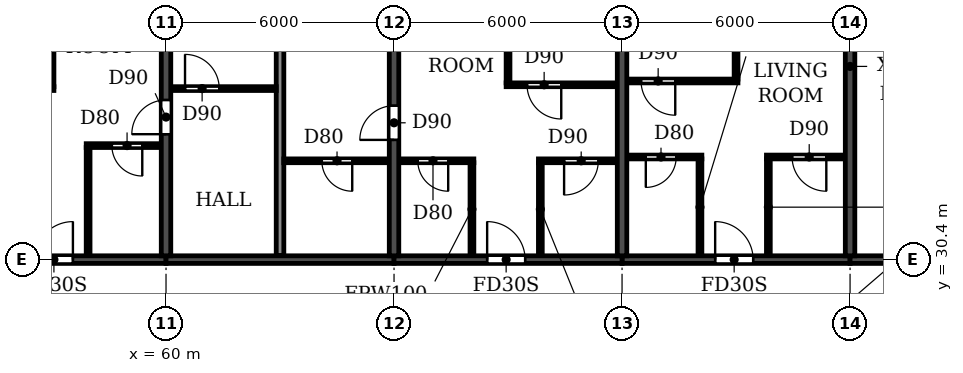
"""IFC4 building model, lengths in metres.
Left out: names, types, materials, properties, quantities, classifications, styles, units other than length and angle.
Written with IfcOpenShell. Run it as: python <this file> out.ifc"""

import sys

from ifc_helpers import new_model, si_unit, direction, frame, frame_2d, origin, place, context, subcontext, project, spatial, rectangle, extrude, element, fill, save


model = new_model("IFC4")
c1 = context("Model", 3, precision=1e-05, world=origin(), true_north=direction((0.0, 1.0)))
c2 = subcontext(c1, "Body", "Model", "MODEL_VIEW")
j1 = project(units=[si_unit("LENGTHUNIT", "METRE"), si_unit("PLANEANGLEUNIT", "RADIAN")], contexts=[c1])
p1 = place(None, origin())
s1 = spatial("IfcSite", under=j1, at=p1, CompositionType="ELEMENT")
p2 = place(p1, origin())
s2 = spatial("IfcBuilding", under=s1, at=p2, CompositionType="ELEMENT")
p3 = place(p2, frame((0.0, 0.0, 175.2)))
s3 = spatial("IfcBuildingStorey", under=s2, at=p3, CompositionType="ELEMENT", Elevation=175.2)
p4 = place(p3, frame((60.0, 30.5, 0.0), z_axis=(0.0, 0.0, 1.0), x_axis=(0.0, 1.0, 0.0)))
e1 = element("IfcWall", 1, at=p4, inside=s3, PredefinedType="SHEAR", context=c2, shape_type="SweptSolid", body=[
    extrude(rectangle(XDim=10.5, YDim=0.25, at=frame_2d((5.25, 0.0))), origin(), (0.0, 0.0, 1.0), 3.08),
])
p5 = place(p4, frame((3.2, 0.0, 0.0)))
e2 = element("IfcOpeningElement", 2, at=p5, cuts=e1, PredefinedType="OPENING", context=c2, shape_type="SweptSolid", body=[
    extrude(rectangle(XDim=0.9, YDim=2.1, at=frame_2d((0.45, 1.05))), frame((0.0, 0.135, 0.0), z_axis=(0.0, -1.0, 0.0), x_axis=(1.0, 0.0, 0.0)), (0.0, 0.0, 1.0), 0.27),
])
p6 = place(p3, frame((66.0, 30.5, 0.0), z_axis=(0.0, 0.0, 1.0), x_axis=(0.0, 1.0, 0.0)))
e3 = element("IfcWall", 3, at=p6, inside=s3, PredefinedType="SHEAR", context=c2, shape_type="SweptSolid", body=[
    extrude(rectangle(XDim=10.5, YDim=0.25, at=frame_2d((5.25, 0.0))), origin(), (0.0, 0.0, 1.0), 3.08),
])
p7 = place(p6, frame((3.05, 0.0, 0.0)))
e4 = element("IfcOpeningElement", 4, at=p7, cuts=e3, PredefinedType="OPENING", context=c2, shape_type="SweptSolid", body=[
    extrude(rectangle(XDim=0.9, YDim=2.1, at=frame_2d((0.45, 1.05))), frame((0.0, 0.135, 0.0), z_axis=(0.0, -1.0, 0.0), x_axis=(1.0, 0.0, 0.0)), (0.0, 0.0, 1.0), 0.27),
])
for number, where, z_axis, x_axis in (
    (5, (72.0, 30.5, 0.0), (0.0, 0.0, 1.0), (0.0, 1.0, 0.0)),
    (6, (78.0, 30.5, 0.0), (0.0, 0.0, 1.0), (0.0, 1.0, 0.0)),
):
    element("IfcWall", number, at=place(p3, frame(where, z_axis=z_axis, x_axis=x_axis)), inside=s3, PredefinedType="SHEAR", context=c2, shape_type="SweptSolid", body=[
        extrude(rectangle(XDim=10.5, YDim=0.25, at=frame_2d((5.25, 0.0))), origin(), (0.0, 0.0, 1.0), 3.08),
    ])
p8 = place(p3, frame((54.0, 30.4, 0.0), z_axis=(0.0, 0.0, 1.0), x_axis=(1.0, 0.0, 0.0)))
e7 = element("IfcWall", 7, at=p8, inside=s3, PredefinedType="SHEAR", context=c2, shape_type="SweptSolid", body=[
    extrude(rectangle(XDim=6.0, YDim=0.2, at=frame_2d((3.0, 0.0))), origin(), (0.0, 0.0, 1.0), 2.48),
])
p9 = place(p8, frame((2.55, 0.0, 0.0)))
e8 = element("IfcOpeningElement", 8, at=p9, cuts=e7, PredefinedType="OPENING", context=c2, shape_type="SweptSolid", body=[
    extrude(rectangle(XDim=1.0, YDim=2.1, at=frame_2d((0.5, 1.05))), frame((0.0, 0.11, 0.0), z_axis=(0.0, -1.0, 0.0), x_axis=(1.0, 0.0, 0.0)), (0.0, 0.0, 1.0), 0.22),
])
p10 = place(p3, frame((60.0, 30.4, 0.0), z_axis=(0.0, 0.0, 1.0), x_axis=(1.0, 0.0, 0.0)))
e9 = element("IfcWall", 9, at=p10, inside=s3, PredefinedType="SHEAR", context=c2, shape_type="SweptSolid", body=[
    extrude(rectangle(XDim=6.0, YDim=0.2, at=frame_2d((3.0, 0.0))), origin(), (0.0, 0.0, 1.0), 2.48),
])
p11 = place(p3, frame((66.0, 30.4, 0.0), z_axis=(0.0, 0.0, 1.0), x_axis=(1.0, 0.0, 0.0)))
e10 = element("IfcWall", 10, at=p11, inside=s3, PredefinedType="SHEAR", context=c2, shape_type="SweptSolid", body=[
    extrude(rectangle(XDim=6.0, YDim=0.2, at=frame_2d((3.0, 0.0))), origin(), (0.0, 0.0, 1.0), 2.48),
])
p12 = place(p11, frame((2.45, 0.0, 0.0)))
e11 = element("IfcOpeningElement", 11, at=p12, cuts=e10, PredefinedType="OPENING", context=c2, shape_type="SweptSolid", body=[
    extrude(rectangle(XDim=1.0, YDim=2.1, at=frame_2d((0.5, 1.05))), frame((0.0, 0.11, 0.0), z_axis=(0.0, -1.0, 0.0), x_axis=(1.0, 0.0, 0.0)), (0.0, 0.0, 1.0), 0.22),
])
p13 = place(p3, frame((72.0, 30.4, 0.0), z_axis=(0.0, 0.0, 1.0), x_axis=(1.0, 0.0, 0.0)))
e12 = element("IfcWall", 12, at=p13, inside=s3, PredefinedType="SHEAR", context=c2, shape_type="SweptSolid", body=[
    extrude(rectangle(XDim=6.0, YDim=0.2, at=frame_2d((3.0, 0.0))), origin(), (0.0, 0.0, 1.0), 2.48),
])
p14 = place(p13, frame((2.45, 0.0, 0.0)))
e13 = element("IfcOpeningElement", 13, at=p14, cuts=e12, PredefinedType="OPENING", context=c2, shape_type="SweptSolid", body=[
    extrude(rectangle(XDim=1.0, YDim=2.1, at=frame_2d((0.5, 1.05))), frame((0.0, 0.11, 0.0), z_axis=(0.0, -1.0, 0.0), x_axis=(1.0, 0.0, 0.0)), (0.0, 0.0, 1.0), 0.22),
])
p15 = place(p3, frame((78.0, 30.4, 0.0), z_axis=(0.0, 0.0, 1.0), x_axis=(1.0, 0.0, 0.0)))
e14 = element("IfcWall", 14, at=p15, inside=s3, PredefinedType="SHEAR", context=c2, shape_type="SweptSolid", body=[
    extrude(rectangle(XDim=5.8, YDim=0.2, at=frame_2d((2.9, 0.0))), origin(), (0.0, 0.0, 1.0), 2.48),
])
p16 = place(p15, frame((2.5, 0.0, 0.0)))
e15 = element("IfcOpeningElement", 15, at=p16, cuts=e14, PredefinedType="OPENING", context=c2, shape_type="SweptSolid", body=[
    extrude(rectangle(XDim=1.0, YDim=2.1, at=frame_2d((0.5, 1.05))), frame((0.0, 0.11, 0.0), z_axis=(0.0, -1.0, 0.0), x_axis=(1.0, 0.0, 0.0)), (0.0, 0.0, 1.0), 0.22),
])
p17 = place(p3, frame((63.0, 30.51, 0.0), z_axis=(0.0, 0.0, 1.0), x_axis=(0.0, 1.0, 0.0)))
e16 = element("IfcWall", 16, at=p17, inside=s3, PredefinedType="PARTITIONING", context=c2, shape_type="SweptSolid", body=[
    extrude(rectangle(XDim=10.63, YDim=0.2, at=frame_2d((5.315, 0.0))), origin(), (0.0, 0.0, 1.0), 3.08),
])
p18 = place(p3, frame((63.1, 33.0, 0.0), z_axis=(0.0, 0.0, 1.0), x_axis=(1.0, 0.0, 0.0)))
e17 = element("IfcWall", 17, at=p18, inside=s3, PredefinedType="PARTITIONING", context=c2, shape_type="SweptSolid", body=[
    extrude(rectangle(XDim=2.765, YDim=0.1, at=frame_2d((1.382, 0.0))), origin(), (0.0, 0.0, 1.0), 3.08),
])
p19 = place(p18, frame((1.0, 0.0, 0.0)))
e18 = element("IfcOpeningElement", 18, at=p19, cuts=e17, PredefinedType="OPENING", context=c2, shape_type="SweptSolid", body=[
    extrude(rectangle(XDim=0.8, YDim=2.1, at=frame_2d((0.4, 1.05))), frame((0.0, 0.06, 0.0), z_axis=(0.0, -1.0, 0.0), x_axis=(1.0, 0.0, 0.0)), (0.0, 0.0, 1.0), 0.12),
])
p20 = place(p3, frame((66.135, 33.0, 0.0), z_axis=(0.0, 0.0, 1.0), x_axis=(1.0, 0.0, 0.0)))
e19 = element("IfcWall", 19, at=p20, inside=s3, PredefinedType="PARTITIONING", context=c2, shape_type="SweptSolid", body=[
    extrude(rectangle(XDim=1.965, YDim=0.1, at=frame_2d((0.982, 0.0))), origin(), (0.0, 0.0, 1.0), 3.08),
])
p21 = place(p20, frame((0.49, 0.0, 0.0)))
e20 = element("IfcOpeningElement", 20, at=p21, cuts=e19, PredefinedType="OPENING", context=c2, shape_type="SweptSolid", body=[
    extrude(rectangle(XDim=0.8, YDim=2.1, at=frame_2d((0.4, 1.05))), frame((0.0, 0.06, 0.0), z_axis=(0.0, -1.0, 0.0), x_axis=(1.0, 0.0, 0.0)), (0.0, 0.0, 1.0), 0.12),
])
p22 = place(p3, frame((69.8, 33.0, 0.0), z_axis=(0.0, 0.0, 1.0), x_axis=(1.0, 0.0, 0.0)))
e21 = element("IfcWall", 21, at=p22, inside=s3, PredefinedType="PARTITIONING", context=c2, shape_type="SweptSolid", body=[
    extrude(rectangle(XDim=2.065, YDim=0.1, at=frame_2d((1.032, 0.0))), origin(), (0.0, 0.0, 1.0), 3.08),
])
p23 = place(p22, frame((0.675, 0.0, 0.0)))
e22 = element("IfcOpeningElement", 22, at=p23, cuts=e21, PredefinedType="OPENING", context=c2, shape_type="SweptSolid", body=[
    extrude(rectangle(XDim=0.9, YDim=2.1, at=frame_2d((0.45, 1.05))), frame((0.0, 0.06, 0.0), z_axis=(0.0, -1.0, 0.0), x_axis=(1.0, 0.0, 0.0)), (0.0, 0.0, 1.0), 0.12),
])
p24 = place(p3, frame((72.135, 33.1, 0.0), z_axis=(0.0, 0.0, 1.0), x_axis=(1.0, 0.0, 0.0)))
e23 = element("IfcWall", 23, at=p24, inside=s3, PredefinedType="PARTITIONING", context=c2, shape_type="SweptSolid", body=[
    extrude(rectangle(XDim=1.965, YDim=0.1, at=frame_2d((0.982, 0.0))), origin(), (0.0, 0.0, 1.0), 3.08),
])
p25 = place(p24, frame((0.49, 0.0, 0.0)))
e24 = element("IfcOpeningElement", 24, at=p25, cuts=e23, PredefinedType="OPENING", context=c2, shape_type="SweptSolid", body=[
    extrude(rectangle(XDim=0.8, YDim=2.1, at=frame_2d((0.4, 1.05))), frame((0.0, 0.06, 0.0), z_axis=(0.0, -1.0, 0.0), x_axis=(1.0, 0.0, 0.0)), (0.0, 0.0, 1.0), 0.12),
])
p26 = place(p3, frame((75.8, 33.1, 0.0), z_axis=(0.0, 0.0, 1.0), x_axis=(1.0, 0.0, 0.0)))
e25 = element("IfcWall", 25, at=p26, inside=s3, PredefinedType="PARTITIONING", context=c2, shape_type="SweptSolid", body=[
    extrude(rectangle(XDim=2.065, YDim=0.1, at=frame_2d((1.032, 0.0))), origin(), (0.0, 0.0, 1.0), 3.08),
])
p27 = place(p26, frame((0.675, 0.0, 0.0)))
e26 = element("IfcOpeningElement", 26, at=p27, cuts=e25, PredefinedType="OPENING", context=c2, shape_type="SweptSolid", body=[
    extrude(rectangle(XDim=0.9, YDim=2.1, at=frame_2d((0.45, 1.05))), frame((0.0, 0.06, 0.0), z_axis=(0.0, -1.0, 0.0), x_axis=(1.0, 0.0, 0.0)), (0.0, 0.0, 1.0), 0.12),
])
p28 = place(p3, frame((57.9, 33.4, 0.0), z_axis=(0.0, 0.0, 1.0), x_axis=(1.0, 0.0, 0.0)))
e27 = element("IfcWall", 27, at=p28, inside=s3, PredefinedType="PARTITIONING", context=c2, shape_type="SweptSolid", body=[
    extrude(rectangle(XDim=1.965, YDim=0.1, at=frame_2d((0.982, 0.0))), origin(), (0.0, 0.0, 1.0), 3.08),
])
p29 = place(p28, frame((0.675, 0.0, 0.0)))
e28 = element("IfcOpeningElement", 28, at=p29, cuts=e27, PredefinedType="OPENING", context=c2, shape_type="SweptSolid", body=[
    extrude(rectangle(XDim=0.8, YDim=2.1, at=frame_2d((0.4, 1.05))), frame((0.0, 0.06, 0.0), z_axis=(0.0, -1.0, 0.0), x_axis=(1.0, 0.0, 0.0)), (0.0, 0.0, 1.0), 0.12),
])
p30 = place(p3, frame((54.135, 34.9, 0.0), z_axis=(0.0, 0.0, 1.0), x_axis=(1.0, 0.0, 0.0)))
e29 = element("IfcWall", 29, at=p30, inside=s3, PredefinedType="PARTITIONING", context=c2, shape_type="SweptSolid", body=[
    extrude(rectangle(XDim=2.915, YDim=0.1, at=frame_2d((1.458, 0.0))), origin(), (0.0, 0.0, 1.0), 3.08),
])
p31 = place(p30, frame((0.365, 0.0, 0.0)))
e30 = element("IfcOpeningElement", 30, at=p31, cuts=e29, PredefinedType="OPENING", context=c2, shape_type="SweptSolid", body=[
    extrude(rectangle(XDim=0.9, YDim=2.1, at=frame_2d((0.45, 1.05))), frame((0.0, 0.06, 0.0), z_axis=(0.0, -1.0, 0.0), x_axis=(1.0, 0.0, 0.0)), (0.0, 0.0, 1.0), 0.12),
])
p32 = place(p3, frame((60.135, 34.9, 0.0), z_axis=(0.0, 0.0, 1.0), x_axis=(1.0, 0.0, 0.0)))
e31 = element("IfcWall", 31, at=p32, inside=s3, PredefinedType="PARTITIONING", context=c2, shape_type="SweptSolid", body=[
    extrude(rectangle(XDim=2.765, YDim=0.1, at=frame_2d((1.382, 0.0))), origin(), (0.0, 0.0, 1.0), 3.08),
])
p33 = place(p32, frame((0.365, 0.0, 0.0)))
e32 = element("IfcOpeningElement", 32, at=p33, cuts=e31, PredefinedType="OPENING", context=c2, shape_type="SweptSolid", body=[
    extrude(rectangle(XDim=0.9, YDim=2.1, at=frame_2d((0.45, 1.05))), frame((0.0, 0.06, 0.0), z_axis=(0.0, -1.0, 0.0), x_axis=(1.0, 0.0, 0.0)), (0.0, 0.0, 1.0), 0.12),
])
p34 = place(p3, frame((68.95, 35.0, 0.0), z_axis=(0.0, 0.0, 1.0), x_axis=(1.0, 0.0, 0.0)))
e33 = element("IfcWall", 33, at=p34, inside=s3, PredefinedType="PARTITIONING", context=c2, shape_type="SweptSolid", body=[
    extrude(rectangle(XDim=2.915, YDim=0.1, at=frame_2d((1.458, 0.0))), origin(), (0.0, 0.0, 1.0), 3.08),
])
p35 = place(p34, frame((0.55, 0.0, 0.0)))
e34 = element("IfcOpeningElement", 34, at=p35, cuts=e33, PredefinedType="OPENING", context=c2, shape_type="SweptSolid", body=[
    extrude(rectangle(XDim=0.9, YDim=2.1, at=frame_2d((0.45, 1.05))), frame((0.0, 0.06, 0.0), z_axis=(0.0, -1.0, 0.0), x_axis=(1.0, 0.0, 0.0)), (0.0, 0.0, 1.0), 0.12),
])
p36 = place(p3, frame((72.135, 35.1, 0.0), z_axis=(0.0, 0.0, 1.0), x_axis=(1.0, 0.0, 0.0)))
e35 = element("IfcWall", 35, at=p36, inside=s3, PredefinedType="PARTITIONING", context=c2, shape_type="SweptSolid", body=[
    extrude(rectangle(XDim=2.915, YDim=0.1, at=frame_2d((1.458, 0.0))), origin(), (0.0, 0.0, 1.0), 3.08),
])
p37 = place(p36, frame((0.365, 0.0, 0.0)))
e36 = element("IfcOpeningElement", 36, at=p37, cuts=e35, PredefinedType="OPENING", context=c2, shape_type="SweptSolid", body=[
    extrude(rectangle(XDim=0.9, YDim=2.1, at=frame_2d((0.45, 1.05))), frame((0.0, 0.06, 0.0), z_axis=(0.0, -1.0, 0.0), x_axis=(1.0, 0.0, 0.0)), (0.0, 0.0, 1.0), 0.12),
])
p38 = place(p3, frame((57.0, 34.95, 0.0), z_axis=(0.0, 0.0, 1.0), x_axis=(0.0, 1.0, 0.0)))
e37 = element("IfcWall", 37, at=p38, inside=s3, PredefinedType="PARTITIONING", context=c2, shape_type="SweptSolid", body=[
    extrude(rectangle(XDim=6.19, YDim=0.1, at=frame_2d((3.095, 0.0))), origin(), (0.0, 0.0, 1.0), 3.08),
])
p39 = place(p3, frame((57.95, 30.51, 0.0), z_axis=(0.0, 0.0, 1.0), x_axis=(0.0, 1.0, 0.0)))
e38 = element("IfcWall", 38, at=p39, inside=s3, PredefinedType="PARTITIONING", context=c2, shape_type="SweptSolid", body=[
    extrude(rectangle(XDim=2.84, YDim=0.1, at=frame_2d((1.42, 0.0))), origin(), (0.0, 0.0, 1.0), 3.08),
])
p40 = place(p3, frame((68.05, 30.51, 0.0), z_axis=(0.0, 0.0, 1.0), x_axis=(0.0, 1.0, 0.0)))
e39 = element("IfcWall", 39, at=p40, inside=s3, PredefinedType="PARTITIONING", context=c2, shape_type="SweptSolid", body=[
    extrude(rectangle(XDim=2.44, YDim=0.1, at=frame_2d((1.22, 0.0))), origin(), (0.0, 0.0, 1.0), 3.08),
])
p41 = place(p3, frame((69.0, 35.05, 0.0), z_axis=(0.0, 0.0, 1.0), x_axis=(0.0, 1.0, 0.0)))
e40 = element("IfcWall", 40, at=p41, inside=s3, PredefinedType="PARTITIONING", context=c2, shape_type="SweptSolid", body=[
    extrude(rectangle(XDim=6.09, YDim=0.1, at=frame_2d((3.045, 0.0))), origin(), (0.0, 0.0, 1.0), 3.08),
])
p42 = place(p3, frame((69.85, 30.51, 0.0), z_axis=(0.0, 0.0, 1.0), x_axis=(0.0, 1.0, 0.0)))
e41 = element("IfcWall", 41, at=p42, inside=s3, PredefinedType="PARTITIONING", context=c2, shape_type="SweptSolid", body=[
    extrude(rectangle(XDim=2.44, YDim=0.1, at=frame_2d((1.22, 0.0))), origin(), (0.0, 0.0, 1.0), 3.08),
])
p43 = place(p3, frame((74.05, 30.51, 0.0), z_axis=(0.0, 0.0, 1.0), x_axis=(0.0, 1.0, 0.0)))
e42 = element("IfcWall", 42, at=p43, inside=s3, PredefinedType="PARTITIONING", context=c2, shape_type="SweptSolid", body=[
    extrude(rectangle(XDim=2.54, YDim=0.1, at=frame_2d((1.27, 0.0))), origin(), (0.0, 0.0, 1.0), 3.08),
])
p44 = place(p3, frame((75.0, 35.15, 0.0), z_axis=(0.0, 0.0, 1.0), x_axis=(0.0, 1.0, 0.0)))
e43 = element("IfcWall", 43, at=p44, inside=s3, PredefinedType="PARTITIONING", context=c2, shape_type="SweptSolid", body=[
    extrude(rectangle(XDim=5.99, YDim=0.1, at=frame_2d((2.995, 0.0))), origin(), (0.0, 0.0, 1.0), 3.08),
])
p45 = place(p3, frame((75.85, 30.51, 0.0), z_axis=(0.0, 0.0, 1.0), x_axis=(0.0, 1.0, 0.0)))
e44 = element("IfcWall", 44, at=p45, inside=s3, PredefinedType="PARTITIONING", context=c2, shape_type="SweptSolid", body=[
    extrude(rectangle(XDim=2.54, YDim=0.1, at=frame_2d((1.27, 0.0))), origin(), (0.0, 0.0, 1.0), 3.08),
])
p46 = place(p33, origin())
e45 = element("IfcDoor", 45, at=p46, inside=s3, OperationType="SINGLE_SWING_LEFT", PredefinedType="DOOR", context=c2, shape_type="SweptSolid", body=[
    extrude(rectangle(XDim=0.9, YDim=2.1, at=frame_2d((0.45, 1.05))), frame((0.0, 0.025, 0.0), z_axis=(0.0, -1.0, 0.0), x_axis=(1.0, 0.0, 0.0)), (0.0, 0.0, 1.0), 0.05),
])
fill(e32, e45)
p47 = place(p9, origin())
e46 = element("IfcDoor", 46, at=p47, inside=s3, OperationType="SINGLE_SWING_RIGHT", PredefinedType="DOOR", context=c2, shape_type="SweptSolid", body=[
    extrude(rectangle(XDim=1.0, YDim=2.1, at=frame_2d((0.5, 1.05))), frame((0.0, 0.025, 0.0), z_axis=(0.0, -1.0, 0.0), x_axis=(1.0, 0.0, 0.0)), (0.0, 0.0, 1.0), 0.05),
])
fill(e8, e46)
p48 = place(p29, frame((0.8, 0.0, 0.0), z_axis=(0.0, 0.0, 1.0), x_axis=(-1.0, 0.0, 0.0)))
e47 = element("IfcDoor", 47, at=p48, inside=s3, OperationType="SINGLE_SWING_LEFT", PredefinedType="DOOR", context=c2, shape_type="SweptSolid", body=[
    extrude(rectangle(XDim=0.8, YDim=2.1, at=frame_2d((0.4, 1.05))), frame((0.0, 0.025, 0.0), z_axis=(0.0, -1.0, 0.0), x_axis=(1.0, 0.0, 0.0)), (0.0, 0.0, 1.0), 0.05),
])
fill(e28, e47)
p49 = place(p5, origin())
e48 = element("IfcDoor", 48, at=p49, inside=s3, OperationType="SINGLE_SWING_LEFT", PredefinedType="DOOR", context=c2, shape_type="SweptSolid", body=[
    extrude(rectangle(XDim=0.9, YDim=2.1, at=frame_2d((0.45, 1.05))), frame((0.0, 0.025, 0.0), z_axis=(0.0, -1.0, 0.0), x_axis=(1.0, 0.0, 0.0)), (0.0, 0.0, 1.0), 0.05),
])
fill(e2, e48)
p50 = place(p19, frame((0.8, 0.0, 0.0), z_axis=(0.0, 0.0, 1.0), x_axis=(-1.0, 0.0, 0.0)))
e49 = element("IfcDoor", 49, at=p50, inside=s3, OperationType="SINGLE_SWING_LEFT", PredefinedType="DOOR", context=c2, shape_type="SweptSolid", body=[
    extrude(rectangle(XDim=0.8, YDim=2.1, at=frame_2d((0.4, 1.05))), frame((0.0, 0.025, 0.0), z_axis=(0.0, -1.0, 0.0), x_axis=(1.0, 0.0, 0.0)), (0.0, 0.0, 1.0), 0.05),
])
fill(e18, e49)
p51 = place(p7, origin())
e50 = element("IfcDoor", 50, at=p51, inside=s3, OperationType="SINGLE_SWING_LEFT", PredefinedType="DOOR", context=c2, shape_type="SweptSolid", body=[
    extrude(rectangle(XDim=0.9, YDim=2.1, at=frame_2d((0.45, 1.05))), frame((0.0, 0.025, 0.0), z_axis=(0.0, -1.0, 0.0), x_axis=(1.0, 0.0, 0.0)), (0.0, 0.0, 1.0), 0.05),
])
fill(e4, e50)
p52 = place(p21, frame((0.8, 0.0, 0.0), z_axis=(0.0, 0.0, 1.0), x_axis=(-1.0, 0.0, 0.0)))
e51 = element("IfcDoor", 51, at=p52, inside=s3, OperationType="SINGLE_SWING_LEFT", PredefinedType="DOOR", context=c2, shape_type="SweptSolid", body=[
    extrude(rectangle(XDim=0.8, YDim=2.1, at=frame_2d((0.4, 1.05))), frame((0.0, 0.025, 0.0), z_axis=(0.0, -1.0, 0.0), x_axis=(1.0, 0.0, 0.0)), (0.0, 0.0, 1.0), 0.05),
])
fill(e20, e51)
p53 = place(p12, origin())
e52 = element("IfcDoor", 52, at=p53, inside=s3, OperationType="SINGLE_SWING_LEFT", PredefinedType="DOOR", context=c2, shape_type="SweptSolid", body=[
    extrude(rectangle(XDim=1.0, YDim=2.1, at=frame_2d((0.5, 1.05))), frame((0.0, 0.025, 0.0), z_axis=(0.0, -1.0, 0.0), x_axis=(1.0, 0.0, 0.0)), (0.0, 0.0, 1.0), 0.05),
])
fill(e11, e52)
p54 = place(p35, frame((0.9, 0.0, 0.0), z_axis=(0.0, 0.0, 1.0), x_axis=(-1.0, 0.0, 0.0)))
e53 = element("IfcDoor", 53, at=p54, inside=s3, OperationType="SINGLE_SWING_LEFT", PredefinedType="DOOR", context=c2, shape_type="SweptSolid", body=[
    extrude(rectangle(XDim=0.9, YDim=2.1, at=frame_2d((0.45, 1.05))), frame((0.0, 0.025, 0.0), z_axis=(0.0, -1.0, 0.0), x_axis=(1.0, 0.0, 0.0)), (0.0, 0.0, 1.0), 0.05),
])
fill(e34, e53)
p55 = place(p23, frame((0.9, 0.0, 0.0), z_axis=(0.0, 0.0, 1.0), x_axis=(-1.0, 0.0, 0.0)))
e54 = element("IfcDoor", 54, at=p55, inside=s3, OperationType="SINGLE_SWING_RIGHT", PredefinedType="DOOR", context=c2, shape_type="SweptSolid", body=[
    extrude(rectangle(XDim=0.9, YDim=2.1, at=frame_2d((0.45, 1.05))), frame((0.0, 0.025, 0.0), z_axis=(0.0, -1.0, 0.0), x_axis=(1.0, 0.0, 0.0)), (0.0, 0.0, 1.0), 0.05),
])
fill(e22, e54)
p56 = place(p37, frame((0.9, 0.0, 0.0), z_axis=(0.0, 0.0, 1.0), x_axis=(-1.0, 0.0, 0.0)))
e55 = element("IfcDoor", 55, at=p56, inside=s3, OperationType="SINGLE_SWING_LEFT", PredefinedType="DOOR", context=c2, shape_type="SweptSolid", body=[
    extrude(rectangle(XDim=0.9, YDim=2.1, at=frame_2d((0.45, 1.05))), frame((0.0, 0.025, 0.0), z_axis=(0.0, -1.0, 0.0), x_axis=(1.0, 0.0, 0.0)), (0.0, 0.0, 1.0), 0.05),
])
fill(e36, e55)
p57 = place(p25, frame((0.8, 0.0, 0.0), z_axis=(0.0, 0.0, 1.0), x_axis=(-1.0, 0.0, 0.0)))
e56 = element("IfcDoor", 56, at=p57, inside=s3, OperationType="SINGLE_SWING_RIGHT", PredefinedType="DOOR", context=c2, shape_type="SweptSolid", body=[
    extrude(rectangle(XDim=0.8, YDim=2.1, at=frame_2d((0.4, 1.05))), frame((0.0, 0.025, 0.0), z_axis=(0.0, -1.0, 0.0), x_axis=(1.0, 0.0, 0.0)), (0.0, 0.0, 1.0), 0.05),
])
fill(e24, e56)
p58 = place(p14, origin())
e57 = element("IfcDoor", 57, at=p58, inside=s3, OperationType="SINGLE_SWING_LEFT", PredefinedType="DOOR", context=c2, shape_type="SweptSolid", body=[
    extrude(rectangle(XDim=1.0, YDim=2.1, at=frame_2d((0.5, 1.05))), frame((0.0, 0.025, 0.0), z_axis=(0.0, -1.0, 0.0), x_axis=(1.0, 0.0, 0.0)), (0.0, 0.0, 1.0), 0.05),
])
fill(e13, e57)
p59 = place(p27, frame((0.9, 0.0, 0.0), z_axis=(0.0, 0.0, 1.0), x_axis=(-1.0, 0.0, 0.0)))
e58 = element("IfcDoor", 58, at=p59, inside=s3, OperationType="SINGLE_SWING_LEFT", PredefinedType="DOOR", context=c2, shape_type="SweptSolid", body=[
    extrude(rectangle(XDim=0.9, YDim=2.1, at=frame_2d((0.45, 1.05))), frame((0.0, 0.025, 0.0), z_axis=(0.0, -1.0, 0.0), x_axis=(1.0, 0.0, 0.0)), (0.0, 0.0, 1.0), 0.05),
])
fill(e26, e58)
save(model, sys.argv[1])
